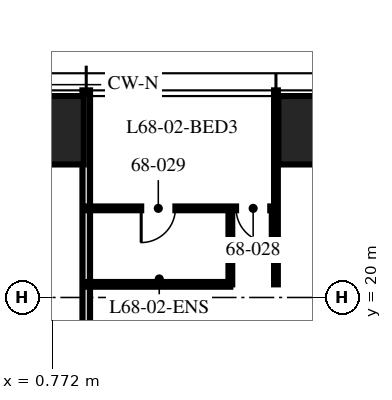
"""IFC4 building model, lengths in metres.
Left out: names, types, materials, properties, quantities, classifications, styles, units other than length and angle.
Written with IfcOpenShell. Run it as: python <this file> out.ifc"""

import sys

from ifc_helpers import new_model, si_unit, direction, frame, frame_2d, origin, origin_2d, place, context, subcontext, project, spatial, rectangle, hollow_rectangle, extrude, element, fill, save


model = new_model("IFC4")
c1 = context("Model", 3, precision=1e-05, world=origin(), true_north=direction((0.0, 1.0)))
c2 = subcontext(c1, "Body", "Model", "MODEL_VIEW")
j1 = project(units=[si_unit("LENGTHUNIT", "METRE"), si_unit("PLANEANGLEUNIT", "RADIAN")], contexts=[c1])
p1 = place(None, origin())
s1 = spatial("IfcSite", under=j1, at=p1, CompositionType="ELEMENT")
p2 = place(p1, origin())
s2 = spatial("IfcBuilding", under=s1, at=p2, CompositionType="ELEMENT")
p3 = place(p2, frame((0.0, 0.0, 270.75)))
s3 = spatial("IfcBuildingStorey", under=s2, at=p3, CompositionType="ELEMENT", Elevation=270.75)
for number, where, z_axis, x_axis in (
    (1, (0.0, 24.4, 0.0), (0.0, 0.0, 1.0), (1.0, 0.0, 0.0)),
    (2, (8.32, 24.4, 0.0), (0.0, 0.0, 1.0), (1.0, 0.0, 0.0)),
):
    element("IfcColumn", number, at=place(p3, frame(where, z_axis=z_axis, x_axis=x_axis)), inside=s3, PredefinedType="COLUMN", context=c2, shape_type="SweptSolid", body=[
        extrude(hollow_rectangle(XDim=3.2, YDim=1.8, WallThickness=0.14, at=origin_2d()), origin(), (0.0, 0.0, 1.0), 3.75),
    ])
p4 = place(p3, frame((6.656, 20.345, 0.0), z_axis=(0.0, 0.0, 1.0), x_axis=(0.0, 1.0, 0.0)))
e3 = element("IfcWall", 3, at=p4, inside=s3, PredefinedType="PARTITIONING", context=c2, shape_type="SweptSolid", body=[
    extrude(rectangle(XDim=5.105, YDim=0.1, at=frame_2d((2.552, 0.0))), origin(), (0.0, 0.0, 1.0), 2.81),
])
p5 = place(p3, frame((1.664, 12.8, 0.0), z_axis=(0.0, 0.0, 1.0), x_axis=(0.0, 1.0, 0.0)))
e4 = element("IfcWall", 4, at=p5, inside=s3, PredefinedType="PARTITIONING", context=c2, shape_type="SweptSolid", body=[
    extrude(rectangle(XDim=12.65, YDim=0.2, at=frame_2d((6.325, 0.0))), origin(), (0.0, 0.0, 1.0), 2.81),
])
p6 = place(p3, frame((6.656, 22.345, 0.0), z_axis=(0.0, 0.0, 1.0), x_axis=(-1.0, 0.0, 0.0)))
e5 = element("IfcWall", 5, at=p6, inside=s3, PredefinedType="PARTITIONING", context=c2, shape_type="SweptSolid", body=[
    extrude(rectangle(XDim=4.992, YDim=0.1, at=frame_2d((2.496, 0.0))), origin(), (0.0, 0.0, 1.0), 2.71),
])
p7 = place(p6, frame((0.15, 0.0, 0.0)))
e6 = element("IfcOpeningElement", 6, at=p7, cuts=e5, PredefinedType="OPENING", context=c2, shape_type="SweptSolid", body=[
    extrude(rectangle(XDim=0.9, YDim=2.1, at=frame_2d((0.45, 1.05))), frame((0.0, 0.06, 0.0), z_axis=(0.0, -1.0, 0.0), x_axis=(1.0, 0.0, 0.0)), (0.0, 0.0, 1.0), 0.12),
])
p8 = place(p6, frame((2.646, 0.0, 0.0)))
e7 = element("IfcOpeningElement", 7, at=p8, cuts=e5, PredefinedType="OPENING", context=c2, shape_type="SweptSolid", body=[
    extrude(rectangle(XDim=0.9, YDim=2.1, at=frame_2d((0.45, 1.05))), frame((0.0, 0.06, 0.0), z_axis=(0.0, -1.0, 0.0), x_axis=(1.0, 0.0, 0.0)), (0.0, 0.0, 1.0), 0.12),
])
p9 = place(p3, frame((5.456, 20.345, 0.0), z_axis=(0.0, 0.0, 1.0), x_axis=(0.0, 1.0, 0.0)))
e8 = element("IfcWall", 8, at=p9, inside=s3, PredefinedType="PARTITIONING", context=c2, shape_type="SweptSolid", body=[
    extrude(rectangle(XDim=2.0, YDim=0.1, at=frame_2d((1.0, 0.0))), origin(), (0.0, 0.0, 1.0), 3.5),
])
p10 = place(p3, frame((5.456, 20.345, 0.0), z_axis=(0.0, 0.0, 1.0), x_axis=(-1.0, 0.0, 0.0)))
e9 = element("IfcWall", 9, at=p10, inside=s3, PredefinedType="PARTITIONING", context=c2, shape_type="SweptSolid", body=[
    extrude(rectangle(XDim=3.792, YDim=0.125, at=frame_2d((1.896, 0.0))), origin(), (0.0, 0.0, 1.0), 2.71),
])
p11 = place(p7, origin())
e10 = element("IfcDoor", 10, at=p11, inside=s3, OperationType="SINGLE_SWING_LEFT", PredefinedType="DOOR", context=c2, shape_type="SweptSolid", body=[
    extrude(rectangle(XDim=0.9, YDim=2.1, at=frame_2d((0.45, 1.05))), frame((0.0, 0.025, 0.0), z_axis=(0.0, -1.0, 0.0), x_axis=(1.0, 0.0, 0.0)), (0.0, 0.0, 1.0), 0.05),
])
fill(e6, e10)
p12 = place(p8, origin())
e11 = element("IfcDoor", 11, at=p12, inside=s3, OperationType="SINGLE_SWING_RIGHT", PredefinedType="DOOR", context=c2, shape_type="SweptSolid", body=[
    extrude(rectangle(XDim=0.9, YDim=2.1, at=frame_2d((0.45, 1.05))), frame((0.0, 0.025, 0.0), z_axis=(0.0, -1.0, 0.0), x_axis=(1.0, 0.0, 0.0)), (0.0, 0.0, 1.0), 0.05),
])
fill(e7, e11)
save(model, sys.argv[1])
